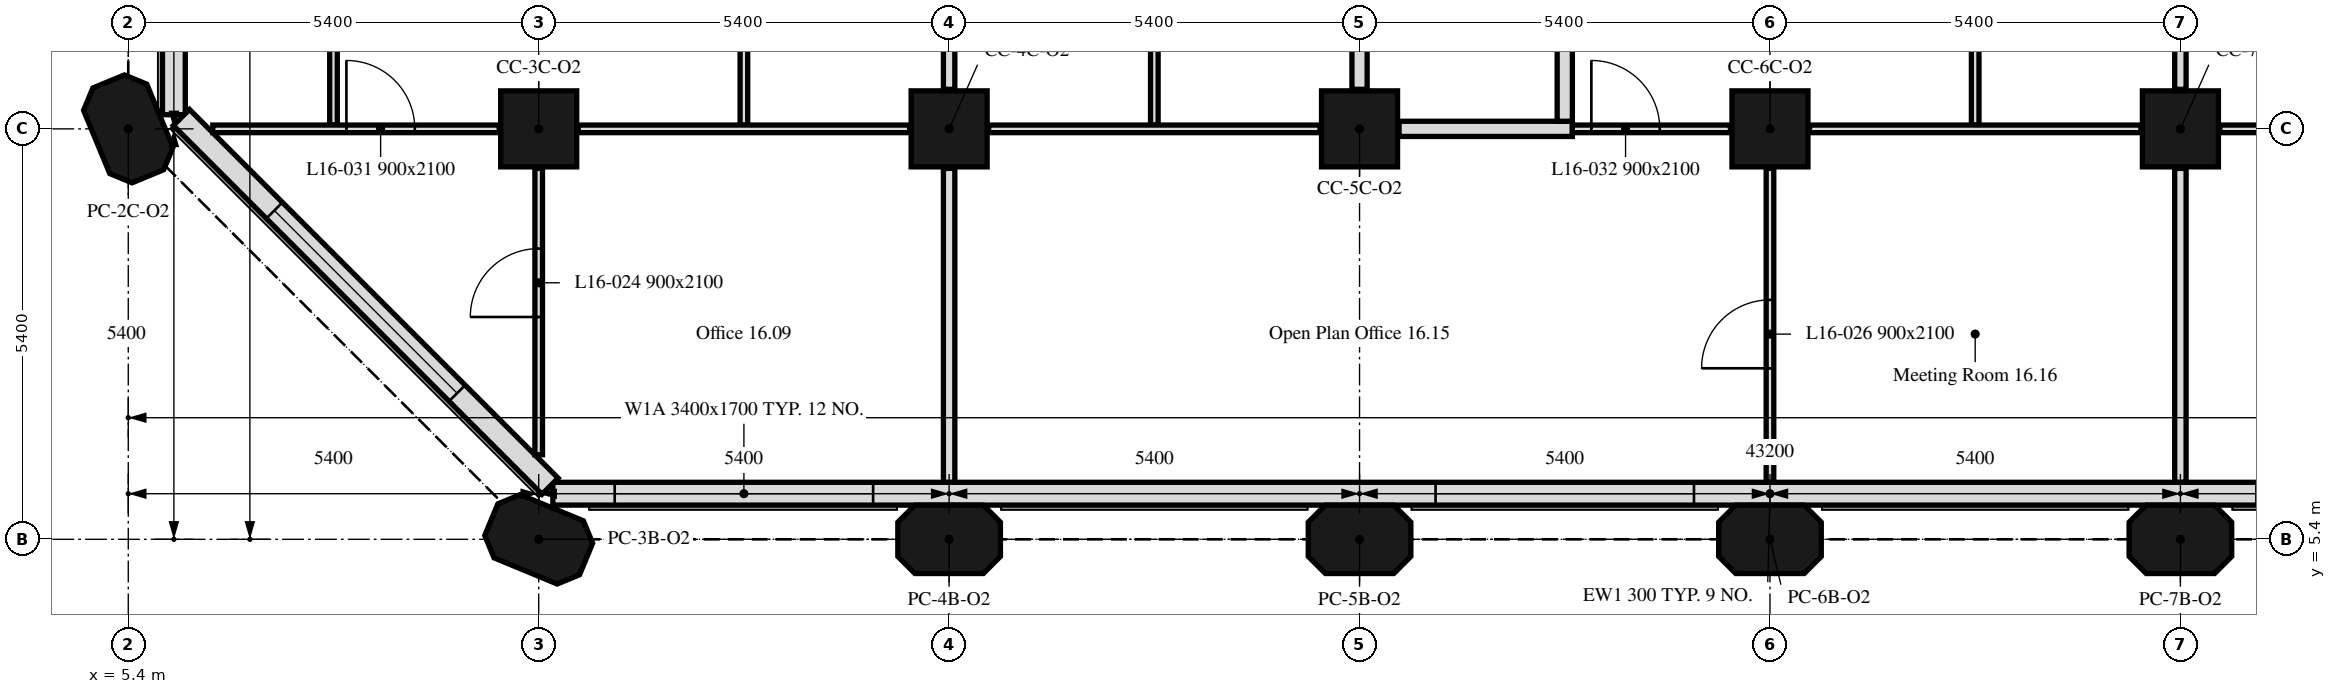
"""IFC4 building model, lengths in metres.
Left out: names, types, materials, properties, quantities, classifications, styles, units other than length and angle.
Written with IfcOpenShell. Run it as: python <this file> out.ifc"""

import sys

from ifc_helpers import new_model, si_unit, direction, frame, frame_2d, origin, origin_2d, place, context, subcontext, project, spatial, polyline, rectangle, outline, extrude, element, fill, save


model = new_model("IFC4")
c1 = context("Model", 3, precision=1e-05, world=origin(), true_north=direction((0.0, 1.0)))
c2 = subcontext(c1, "Body", "Model", "MODEL_VIEW")
j1 = project(units=[si_unit("LENGTHUNIT", "METRE"), si_unit("PLANEANGLEUNIT", "RADIAN")], contexts=[c1])
p1 = place(None, origin())
s1 = spatial("IfcSite", under=j1, at=p1, CompositionType="ELEMENT")
p2 = place(p1, origin())
s2 = spatial("IfcBuilding", under=s1, at=p2, CompositionType="ELEMENT")
p3 = place(p2, frame((0.0, 0.0, 72.6)))
s3 = spatial("IfcBuildingStorey", under=s2, at=p3, CompositionType="ELEMENT", Elevation=72.6)
for number, where, z_axis, x_axis in (
    (1, (10.8, 5.4, 0.0), (0.0, 0.0, 1.0), (-0.924, 0.383, 0.0)),
    (2, (16.2, 5.4, 0.0), (0.0, 0.0, 1.0), (1.0, 0.0, 0.0)),
    (3, (21.6, 5.4, 0.0), (0.0, 0.0, 1.0), (1.0, 0.0, 0.0)),
    (4, (27.0, 5.4, 0.0), (0.0, 0.0, 1.0), (1.0, 0.0, 0.0)),
    (5, (32.4, 5.4, 0.0), (0.0, 0.0, 1.0), (1.0, 0.0, 0.0)),
    (6, (5.4, 10.8, 0.0), (0.0, 0.0, 1.0), (-0.383, 0.924, 0.0)),
):
    element("IfcColumn", number, at=place(p3, frame(where, z_axis=z_axis, x_axis=x_axis)), inside=s3, PredefinedType="COLUMN", context=c2, shape_type="SweptSolid", body=[
        extrude(outline(polyline([(-0.45, -0.45), (0.45, -0.45), (0.675, -0.225), (0.675, 0.225), (0.45, 0.45), (-0.45, 0.45), (-0.675, 0.225), (-0.675, -0.225), (-0.45, -0.45)])), origin(), (0.0, 0.0, 1.0), 3.5),
    ])
for number, where, z_axis, x_axis in (
    (7, (10.8, 10.8, 0.0), (0.0, 0.0, 1.0), (1.0, 0.0, 0.0)),
    (8, (16.2, 10.8, 0.0), (0.0, 0.0, 1.0), (1.0, 0.0, 0.0)),
    (9, (21.6, 10.8, 0.0), (0.0, 0.0, 1.0), (1.0, 0.0, 0.0)),
    (10, (27.0, 10.8, 0.0), (0.0, 0.0, 1.0), (1.0, 0.0, 0.0)),
    (11, (32.4, 10.8, 0.0), (0.0, 0.0, 1.0), (1.0, 0.0, 0.0)),
):
    element("IfcColumn", number, at=place(p3, frame(where, z_axis=z_axis, x_axis=x_axis)), inside=s3, PredefinedType="COLUMN", context=c2, shape_type="SweptSolid", body=[
        extrude(rectangle(XDim=1.0, YDim=1.0, at=origin_2d()), origin(), (0.0, 0.0, 1.0), 3.5),
    ])
p4 = place(p3, frame((10.986, 6.0, 0.0), z_axis=(0.0, 0.0, 1.0), x_axis=(1.0, 0.0, 0.0)))
e12 = element("IfcWall", 12, at=p4, inside=s3, PredefinedType="SOLIDWALL", context=c2, shape_type="SweptSolid", body=[
    extrude(rectangle(XDim=32.027, YDim=0.3, at=frame_2d((16.014, 0.0))), origin(), (0.0, 0.0, 1.0), 3.5),
])
p5 = place(p4, frame((0.814, 0.0, 0.9)))
e13 = element("IfcOpeningElement", 13, at=p5, cuts=e12, PredefinedType="OPENING", context=c2, shape_type="SweptSolid", body=[
    extrude(rectangle(XDim=3.4, YDim=1.7, at=frame_2d((1.7, 0.85))), frame((0.0, 0.16, 0.0), z_axis=(0.0, -1.0, 0.0), x_axis=(1.0, 0.0, 0.0)), (0.0, 0.0, 1.0), 0.32),
])
p6 = place(p4, frame((11.614, 0.0, 0.9)))
e14 = element("IfcOpeningElement", 14, at=p6, cuts=e12, PredefinedType="OPENING", context=c2, shape_type="SweptSolid", body=[
    extrude(rectangle(XDim=3.4, YDim=1.7, at=frame_2d((1.7, 0.85))), frame((0.0, 0.16, 0.0), z_axis=(0.0, -1.0, 0.0), x_axis=(1.0, 0.0, 0.0)), (0.0, 0.0, 1.0), 0.32),
])
p7 = place(p4, frame((22.414, 0.0, 0.9)))
e15 = element("IfcOpeningElement", 15, at=p7, cuts=e12, PredefinedType="OPENING", context=c2, shape_type="SweptSolid", body=[
    extrude(rectangle(XDim=3.4, YDim=1.7, at=frame_2d((1.7, 0.85))), frame((0.0, 0.16, 0.0), z_axis=(0.0, -1.0, 0.0), x_axis=(1.0, 0.0, 0.0)), (0.0, 0.0, 1.0), 0.32),
])
p8 = place(p3, frame((6.0, 16.2, 0.0), z_axis=(0.0, 0.0, 1.0), x_axis=(0.0, -1.0, 0.0)))
e16 = element("IfcWall", 16, at=p8, inside=s3, PredefinedType="SOLIDWALL", context=c2, shape_type="SweptSolid", body=[
    extrude(rectangle(XDim=5.214, YDim=0.3, at=frame_2d((2.607, 0.0))), origin(), (0.0, 0.0, 1.0), 3.5),
])
p9 = place(p3, frame((6.099, 10.949, 0.0), z_axis=(0.0, 0.0, 1.0), x_axis=(0.707106781187, -0.707106781187, 0.0)))
e17 = element("IfcWall", 17, at=p9, inside=s3, PredefinedType="SOLIDWALL", context=c2, shape_type="SweptSolid", body=[
    extrude(rectangle(XDim=6.86, YDim=0.3, at=frame_2d((3.43, 0.0))), origin(), (0.0, 0.0, 1.0), 3.5),
])
p10 = place(p9, frame((1.73, 0.0, 0.9)))
e18 = element("IfcOpeningElement", 18, at=p10, cuts=e17, PredefinedType="OPENING", context=c2, shape_type="SweptSolid", body=[
    extrude(rectangle(XDim=3.4, YDim=1.7, at=frame_2d((1.7, 0.85))), frame((0.0, 0.16, 0.0), z_axis=(0.0, -1.0, 0.0), x_axis=(1.0, 0.0, 0.0)), (0.0, 0.0, 1.0), 0.32),
])
p11 = place(p3, frame((8.1, 10.85, 0.0), z_axis=(0.0, 0.0, 1.0), x_axis=(0.0, 1.0, 0.0)))
e19 = element("IfcWall", 19, at=p11, inside=s3, PredefinedType="PARTITIONING", context=c2, shape_type="SweptSolid", body=[
    extrude(rectangle(XDim=2.575, YDim=0.1, at=frame_2d((1.288, 0.0))), origin(), (0.0, 0.0, 1.0), 3.5),
])
p12 = place(p3, frame((6.512, 10.8, 0.0), z_axis=(0.0, 0.0, 1.0), x_axis=(1.0, 0.0, 0.0)))
e20 = element("IfcWall", 20, at=p12, inside=s3, PredefinedType="PARTITIONING", context=c2, shape_type="SweptSolid", body=[
    extrude(rectangle(XDim=3.768, YDim=0.1, at=frame_2d((1.884, 0.0))), origin(), (0.0, 0.0, 1.0), 3.5),
])
p13 = place(p12, frame((1.758, 0.0, 0.0)))
e21 = element("IfcOpeningElement", 21, at=p13, cuts=e20, PredefinedType="OPENING", context=c2, shape_type="SweptSolid", body=[
    extrude(rectangle(XDim=0.9, YDim=2.1, at=frame_2d((0.45, 1.05))), frame((0.0, 0.05, 0.0), z_axis=(0.0, -1.0, 0.0), x_axis=(1.0, 0.0, 0.0)), (0.0, 0.0, 1.0), 0.1),
])
p14 = place(p3, frame((13.5, 10.85, 0.0), z_axis=(0.0, 0.0, 1.0), x_axis=(0.0, 1.0, 0.0)))
e22 = element("IfcWall", 22, at=p14, inside=s3, PredefinedType="PARTITIONING", context=c2, shape_type="SweptSolid", body=[
    extrude(rectangle(XDim=2.575, YDim=0.1, at=frame_2d((1.288, 0.0))), origin(), (0.0, 0.0, 1.0), 3.5),
])
p15 = place(p14, frame((1.425, 0.0, 0.0)))
e23 = element("IfcOpeningElement", 23, at=p15, cuts=e22, PredefinedType="OPENING", context=c2, shape_type="SweptSolid", body=[
    extrude(rectangle(XDim=0.9, YDim=2.1, at=frame_2d((0.45, 1.05))), frame((0.0, 0.05, 0.0), z_axis=(0.0, -1.0, 0.0), x_axis=(1.0, 0.0, 0.0)), (0.0, 0.0, 1.0), 0.1),
])
p16 = place(p3, frame((11.32, 10.8, 0.0), z_axis=(0.0, 0.0, 1.0), x_axis=(1.0, 0.0, 0.0)))
e24 = element("IfcWall", 24, at=p16, inside=s3, PredefinedType="PARTITIONING", context=c2, shape_type="SweptSolid", body=[
    extrude(rectangle(XDim=4.36, YDim=0.1, at=frame_2d((2.18, 0.0))), origin(), (0.0, 0.0, 1.0), 3.5),
])
p17 = place(p3, frame((16.2, 11.32, 0.0), z_axis=(0.0, 0.0, 1.0), x_axis=(0.0, 1.0, 0.0)))
e25 = element("IfcWall", 25, at=p17, inside=s3, PredefinedType="PARTITIONING", context=c2, shape_type="SweptSolid", body=[
    extrude(rectangle(XDim=2.105, YDim=0.15, at=frame_2d((1.052, 0.0))), origin(), (0.0, 0.0, 1.0), 3.5),
])
p18 = place(p3, frame((10.8, 6.512, 0.0), z_axis=(0.0, 0.0, 1.0), x_axis=(0.0, 1.0, 0.0)))
e26 = element("IfcWall", 26, at=p18, inside=s3, PredefinedType="PARTITIONING", context=c2, shape_type="SweptSolid", body=[
    extrude(rectangle(XDim=3.768, YDim=0.1, at=frame_2d((1.884, 0.0))), origin(), (0.0, 0.0, 1.0), 3.5),
])
p19 = place(p18, frame((1.813, 0.0, 0.0)))
e27 = element("IfcOpeningElement", 27, at=p19, cuts=e26, PredefinedType="OPENING", context=c2, shape_type="SweptSolid", body=[
    extrude(rectangle(XDim=0.9, YDim=2.1, at=frame_2d((0.45, 1.05))), frame((0.0, 0.05, 0.0), z_axis=(0.0, -1.0, 0.0), x_axis=(1.0, 0.0, 0.0)), (0.0, 0.0, 1.0), 0.1),
])
p20 = place(p3, frame((16.2, 6.151, 0.0), z_axis=(0.0, 0.0, 1.0), x_axis=(0.0, 1.0, 0.0)))
e28 = element("IfcWall", 28, at=p20, inside=s3, PredefinedType="PARTITIONING", context=c2, shape_type="SweptSolid", body=[
    extrude(rectangle(XDim=4.129, YDim=0.15, at=frame_2d((2.064, 0.0))), origin(), (0.0, 0.0, 1.0), 3.5),
])
p21 = place(p3, frame((18.9, 10.85, 0.0), z_axis=(0.0, 0.0, 1.0), x_axis=(0.0, 1.0, 0.0)))
e29 = element("IfcWall", 29, at=p21, inside=s3, PredefinedType="PARTITIONING", context=c2, shape_type="SweptSolid", body=[
    extrude(rectangle(XDim=2.575, YDim=0.1, at=frame_2d((1.288, 0.0))), origin(), (0.0, 0.0, 1.0), 3.5),
])
p22 = place(p3, frame((16.72, 10.8, 0.0), z_axis=(0.0, 0.0, 1.0), x_axis=(1.0, 0.0, 0.0)))
e30 = element("IfcWall", 30, at=p22, inside=s3, PredefinedType="PARTITIONING", context=c2, shape_type="SweptSolid", body=[
    extrude(rectangle(XDim=4.36, YDim=0.1, at=frame_2d((2.18, 0.0))), origin(), (0.0, 0.0, 1.0), 3.5),
])
p23 = place(p3, frame((21.6, 11.32, 0.0), z_axis=(0.0, 0.0, 1.0), x_axis=(0.0, 1.0, 0.0)))
e31 = element("IfcWall", 31, at=p23, inside=s3, PredefinedType="PARTITIONING", context=c2, shape_type="SweptSolid", body=[
    extrude(rectangle(XDim=2.08, YDim=0.2, at=frame_2d((1.04, 0.0))), origin(), (0.0, 0.0, 1.0), 3.5),
])
p24 = place(p3, frame((22.12, 10.8, 0.0), z_axis=(0.0, 0.0, 1.0), x_axis=(1.0, 0.0, 0.0)))
e32 = element("IfcWall", 32, at=p24, inside=s3, PredefinedType="PARTITIONING", context=c2, shape_type="SweptSolid", body=[
    extrude(rectangle(XDim=2.28, YDim=0.2, at=frame_2d((1.14, 0.0))), origin(), (0.0, 0.0, 1.0), 3.5),
])
p25 = place(p3, frame((24.3, 10.9, 0.0), z_axis=(0.0, 0.0, 1.0), x_axis=(0.0, 1.0, 0.0)))
e33 = element("IfcWall", 33, at=p25, inside=s3, PredefinedType="PARTITIONING", context=c2, shape_type="SweptSolid", body=[
    extrude(rectangle(XDim=2.5, YDim=0.2, at=frame_2d((1.25, 0.0))), origin(), (0.0, 0.0, 1.0), 3.5),
])
p26 = place(p3, frame((24.4, 10.8, 0.0), z_axis=(0.0, 0.0, 1.0), x_axis=(1.0, 0.0, 0.0)))
e34 = element("IfcWall", 34, at=p26, inside=s3, PredefinedType="PARTITIONING", context=c2, shape_type="SweptSolid", body=[
    extrude(rectangle(XDim=2.08, YDim=0.1, at=frame_2d((1.04, 0.0))), origin(), (0.0, 0.0, 1.0), 3.5),
])
p27 = place(p26, frame((0.25, 0.0, 0.0)))
e35 = element("IfcOpeningElement", 35, at=p27, cuts=e34, PredefinedType="OPENING", context=c2, shape_type="SweptSolid", body=[
    extrude(rectangle(XDim=0.9, YDim=2.1, at=frame_2d((0.45, 1.05))), frame((0.0, 0.05, 0.0), z_axis=(0.0, -1.0, 0.0), x_axis=(1.0, 0.0, 0.0)), (0.0, 0.0, 1.0), 0.1),
])
p28 = place(p3, frame((29.7, 10.85, 0.0), z_axis=(0.0, 0.0, 1.0), x_axis=(0.0, 1.0, 0.0)))
e36 = element("IfcWall", 36, at=p28, inside=s3, PredefinedType="PARTITIONING", context=c2, shape_type="SweptSolid", body=[
    extrude(rectangle(XDim=2.575, YDim=0.1, at=frame_2d((1.288, 0.0))), origin(), (0.0, 0.0, 1.0), 3.5),
])
p29 = place(p28, frame((1.425, 0.0, 0.0)))
e37 = element("IfcOpeningElement", 37, at=p29, cuts=e36, PredefinedType="OPENING", context=c2, shape_type="SweptSolid", body=[
    extrude(rectangle(XDim=0.9, YDim=2.1, at=frame_2d((0.45, 1.05))), frame((0.0, 0.05, 0.0), z_axis=(0.0, -1.0, 0.0), x_axis=(1.0, 0.0, 0.0)), (0.0, 0.0, 1.0), 0.1),
])
p30 = place(p3, frame((27.52, 10.8, 0.0), z_axis=(0.0, 0.0, 1.0), x_axis=(1.0, 0.0, 0.0)))
e38 = element("IfcWall", 38, at=p30, inside=s3, PredefinedType="PARTITIONING", context=c2, shape_type="SweptSolid", body=[
    extrude(rectangle(XDim=4.36, YDim=0.1, at=frame_2d((2.18, 0.0))), origin(), (0.0, 0.0, 1.0), 3.5),
])
p31 = place(p3, frame((32.4, 11.32, 0.0), z_axis=(0.0, 0.0, 1.0), x_axis=(0.0, 1.0, 0.0)))
e39 = element("IfcWall", 39, at=p31, inside=s3, PredefinedType="PARTITIONING", context=c2, shape_type="SweptSolid", body=[
    extrude(rectangle(XDim=2.105, YDim=0.15, at=frame_2d((1.052, 0.0))), origin(), (0.0, 0.0, 1.0), 3.5),
])
p32 = place(p3, frame((27.0, 6.151, 0.0), z_axis=(0.0, 0.0, 1.0), x_axis=(0.0, 1.0, 0.0)))
e40 = element("IfcWall", 40, at=p32, inside=s3, PredefinedType="PARTITIONING", context=c2, shape_type="SweptSolid", body=[
    extrude(rectangle(XDim=4.129, YDim=0.1, at=frame_2d((2.064, 0.0))), origin(), (0.0, 0.0, 1.0), 3.5),
])
p33 = place(p32, frame((1.499, 0.0, 0.0)))
e41 = element("IfcOpeningElement", 41, at=p33, cuts=e40, PredefinedType="OPENING", context=c2, shape_type="SweptSolid", body=[
    extrude(rectangle(XDim=0.9, YDim=2.1, at=frame_2d((0.45, 1.05))), frame((0.0, 0.05, 0.0), z_axis=(0.0, -1.0, 0.0), x_axis=(1.0, 0.0, 0.0)), (0.0, 0.0, 1.0), 0.1),
])
p34 = place(p3, frame((32.4, 6.151, 0.0), z_axis=(0.0, 0.0, 1.0), x_axis=(0.0, 1.0, 0.0)))
e42 = element("IfcWall", 42, at=p34, inside=s3, PredefinedType="PARTITIONING", context=c2, shape_type="SweptSolid", body=[
    extrude(rectangle(XDim=4.129, YDim=0.15, at=frame_2d((2.064, 0.0))), origin(), (0.0, 0.0, 1.0), 3.5),
])
p35 = place(p3, frame((32.92, 10.8, 0.0), z_axis=(0.0, 0.0, 1.0), x_axis=(1.0, 0.0, 0.0)))
e43 = element("IfcWall", 43, at=p35, inside=s3, PredefinedType="PARTITIONING", context=c2, shape_type="SweptSolid", body=[
    extrude(rectangle(XDim=4.36, YDim=0.1, at=frame_2d((2.18, 0.0))), origin(), (0.0, 0.0, 1.0), 3.5),
])
p36 = place(p35, frame((1.73, 0.0, 0.0)))
e44 = element("IfcOpeningElement", 44, at=p36, cuts=e43, PredefinedType="OPENING", context=c2, shape_type="SweptSolid", body=[
    extrude(rectangle(XDim=0.9, YDim=2.1, at=frame_2d((0.45, 1.05))), frame((0.0, 0.05, 0.0), z_axis=(0.0, -1.0, 0.0), x_axis=(1.0, 0.0, 0.0)), (0.0, 0.0, 1.0), 0.1),
])
p37 = place(p5, origin())
e45 = element("IfcWindow", 45, at=p37, inside=s3, PartitioningType="SINGLE_PANEL", PredefinedType="WINDOW", context=c2, shape_type="SweptSolid", body=[
    extrude(rectangle(XDim=3.4, YDim=1.7, at=frame_2d((1.7, 0.85))), frame((0.0, 0.03, 0.0), z_axis=(0.0, -1.0, 0.0), x_axis=(1.0, 0.0, 0.0)), (0.0, 0.0, 1.0), 0.06),
])
fill(e13, e45)
p38 = place(p6, origin())
e46 = element("IfcWindow", 46, at=p38, inside=s3, PartitioningType="SINGLE_PANEL", PredefinedType="WINDOW", context=c2, shape_type="SweptSolid", body=[
    extrude(rectangle(XDim=3.4, YDim=1.7, at=frame_2d((1.7, 0.85))), frame((0.0, 0.03, 0.0), z_axis=(0.0, -1.0, 0.0), x_axis=(1.0, 0.0, 0.0)), (0.0, 0.0, 1.0), 0.06),
])
fill(e14, e46)
p39 = place(p10, origin())
e47 = element("IfcWindow", 47, at=p39, inside=s3, PartitioningType="SINGLE_PANEL", PredefinedType="WINDOW", context=c2, shape_type="SweptSolid", body=[
    extrude(rectangle(XDim=3.4, YDim=1.7, at=frame_2d((1.7, 0.85))), frame((0.0, 0.03, 0.0), z_axis=(0.0, -1.0, 0.0), x_axis=(1.0, 0.0, 0.0)), (0.0, 0.0, 1.0), 0.06),
])
fill(e18, e47)
p40 = place(p19, origin())
e48 = element("IfcDoor", 48, at=p40, inside=s3, OperationType="SINGLE_SWING_LEFT", PredefinedType="DOOR", context=c2, shape_type="SweptSolid", body=[
    extrude(rectangle(XDim=0.9, YDim=2.1, at=frame_2d((0.45, 1.05))), frame((0.0, 0.025, 0.0), z_axis=(0.0, -1.0, 0.0), x_axis=(1.0, 0.0, 0.0)), (0.0, 0.0, 1.0), 0.05),
])
fill(e27, e48)
p41 = place(p33, origin())
e49 = element("IfcDoor", 49, at=p41, inside=s3, OperationType="SINGLE_SWING_LEFT", PredefinedType="DOOR", context=c2, shape_type="SweptSolid", body=[
    extrude(rectangle(XDim=0.9, YDim=2.1, at=frame_2d((0.45, 1.05))), frame((0.0, 0.025, 0.0), z_axis=(0.0, -1.0, 0.0), x_axis=(1.0, 0.0, 0.0)), (0.0, 0.0, 1.0), 0.05),
])
fill(e41, e49)
p42 = place(p13, origin())
e50 = element("IfcDoor", 50, at=p42, inside=s3, OperationType="SINGLE_SWING_RIGHT", PredefinedType="DOOR", context=c2, shape_type="SweptSolid", body=[
    extrude(rectangle(XDim=0.9, YDim=2.1, at=frame_2d((0.45, 1.05))), frame((0.0, 0.025, 0.0), z_axis=(0.0, -1.0, 0.0), x_axis=(1.0, 0.0, 0.0)), (0.0, 0.0, 1.0), 0.05),
])
fill(e21, e50)
p43 = place(p27, origin())
e51 = element("IfcDoor", 51, at=p43, inside=s3, OperationType="SINGLE_SWING_LEFT", PredefinedType="DOOR", context=c2, shape_type="SweptSolid", body=[
    extrude(rectangle(XDim=0.9, YDim=2.1, at=frame_2d((0.45, 1.05))), frame((0.0, 0.025, 0.0), z_axis=(0.0, -1.0, 0.0), x_axis=(1.0, 0.0, 0.0)), (0.0, 0.0, 1.0), 0.05),
])
fill(e35, e51)
save(model, sys.argv[1])
